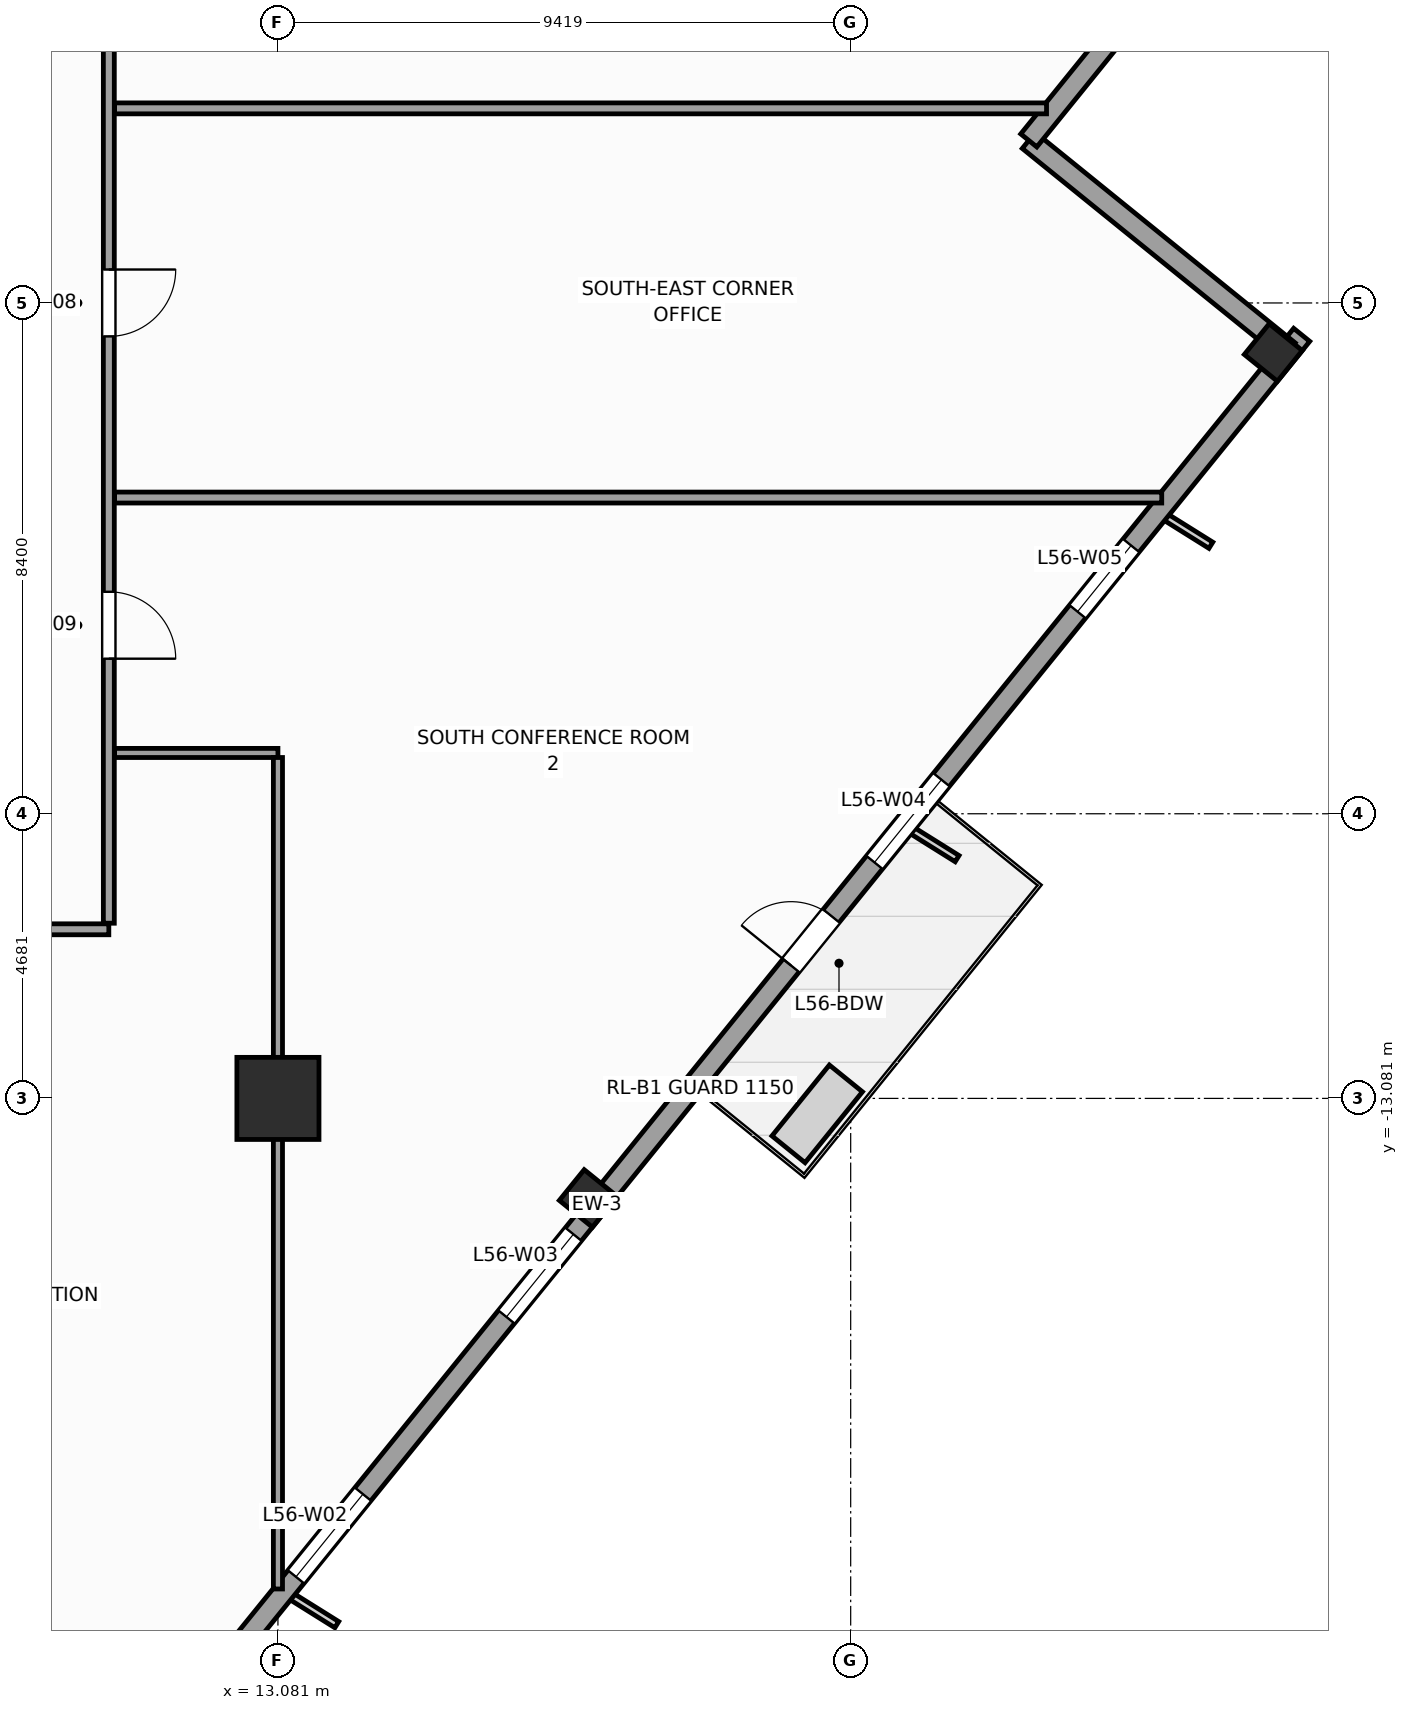
"""IFC4 building model, lengths in metres.
Left out: names, types, materials, properties, quantities, classifications, styles, units other than length and angle.
Written with IfcOpenShell. Run it as: python <this file> out.ifc"""

import sys

from ifc_helpers import new_model, si_unit, direction, frame, frame_2d, origin, origin_2d, place, context, subcontext, project, spatial, rectangle, extrude, source, transform, mapped, element, fill, save


model = new_model("IFC4")
c1 = context("Model", 3, precision=1e-05, world=origin(), true_north=direction((0.0, 1.0)))
c2 = subcontext(c1, "Body", "Model", "MODEL_VIEW")
j1 = project(units=[si_unit("LENGTHUNIT", "METRE"), si_unit("PLANEANGLEUNIT", "RADIAN")], contexts=[c1])
p1 = place(None, origin())
s1 = spatial("IfcSite", under=j1, at=p1, CompositionType="ELEMENT")
p2 = place(p1, origin())
s2 = spatial("IfcBuilding", under=s1, at=p2, CompositionType="ELEMENT")
p3 = place(p2, frame((0.0, 0.0, 232.9)))
s3 = spatial("IfcBuildingStorey", under=s2, at=p3, CompositionType="ELEMENT", Elevation=232.9)
m1 = source(origin(), c2, "Body", "SweptSolid", [
    extrude(rectangle(XDim=1.35, YDim=1.35, at=origin_2d()), origin(), (0.0, 0.0, 1.0), 3.9),
])
p4 = place(p3, frame((13.081, -13.081, 0.0), z_axis=(0.0, 0.0, 1.0), x_axis=(1.0, 0.0, 0.0)))
e1 = element("IfcColumn", 1, at=p4, inside=s3, PredefinedType="COLUMN", context=c2, shape_type="MappedRepresentation", body=[
    mapped(m1, transform((0.0, 0.0, 0.0), scale=1.0)),
])
m2 = source(origin(), c2, "Body", "SweptSolid", [
    extrude(rectangle(XDim=0.65, YDim=0.7, at=origin_2d()), origin(), (0.0, 0.0, 1.0), 3.9),
])
for number, where, z_axis, x_axis in (
    (2, (18.185, -14.726, 0.0), (0.0, 0.0, 1.0), (0.629, 0.777, 0.0)),
    (3, (29.45, -0.815, 0.0), (0.0, 0.0, 1.0), (0.629, 0.777, 0.0)),
):
    element("IfcColumn", number, at=place(p3, frame(where, z_axis=z_axis, x_axis=x_axis)), inside=s3, PredefinedType="COLUMN", context=c2, shape_type="MappedRepresentation", body=[
        mapped(m2, transform((0.0, 0.0, 0.0), scale=1.0)),
    ])
p5 = place(p3, frame((6.733, -29.154, 0.0), z_axis=(0.0, 0.0, 1.0), x_axis=(0.629325378072, 0.77714192302, 0.0)))
e4 = element("IfcWall", 4, at=p5, inside=s3, PredefinedType="STANDARD", context=c2, shape_type="SweptSolid", body=[
    extrude(rectangle(XDim=36.84, YDim=0.34, at=frame_2d((18.42, 0.0))), origin(), (0.0, 0.0, 1.0), 2.96),
])
p6 = place(p5, frame((23.495, 0.0, 0.0)))
e5 = element("IfcOpeningElement", 5, at=p6, cuts=e4, PredefinedType="OPENING", context=c2, shape_type="SweptSolid", body=[
    extrude(rectangle(XDim=1.05, YDim=2.25, at=frame_2d((0.525, 1.125))), frame((0.0, 0.18, 0.0), z_axis=(0.0, -1.0, 0.0), x_axis=(1.0, 0.0, 0.0)), (0.0, 0.0, 1.0), 0.36),
])
p7 = place(p5, frame((3.721, 0.0, 0.48)))
e6 = element("IfcOpeningElement", 6, at=p7, cuts=e4, PredefinedType="OPENING", context=c2, shape_type="SweptSolid", body=[
    extrude(rectangle(XDim=1.4, YDim=2.4, at=frame_2d((0.7, 1.2))), frame((0.0, 0.18, 0.0), z_axis=(0.0, -1.0, 0.0), x_axis=(1.0, 0.0, 0.0)), (0.0, 0.0, 1.0), 0.36),
])
p8 = place(p5, frame((10.559, 0.0, 0.58)))
e7 = element("IfcOpeningElement", 7, at=p8, cuts=e4, PredefinedType="OPENING", context=c2, shape_type="SweptSolid", body=[
    extrude(rectangle(XDim=1.75, YDim=2.3, at=frame_2d((0.875, 1.15))), frame((0.0, 0.18, 0.0), z_axis=(0.0, -1.0, 0.0), x_axis=(1.0, 0.0, 0.0)), (0.0, 0.0, 1.0), 0.36),
])
p9 = place(p5, frame((16.058, 0.0, 0.58)))
e8 = element("IfcOpeningElement", 8, at=p9, cuts=e4, PredefinedType="OPENING", context=c2, shape_type="SweptSolid", body=[
    extrude(rectangle(XDim=1.75, YDim=2.3, at=frame_2d((0.875, 1.15))), frame((0.0, 0.18, 0.0), z_axis=(0.0, -1.0, 0.0), x_axis=(1.0, 0.0, 0.0)), (0.0, 0.0, 1.0), 0.36),
])
p10 = place(p5, frame((25.676, 0.0, 0.58)))
e9 = element("IfcOpeningElement", 9, at=p10, cuts=e4, PredefinedType="OPENING", context=c2, shape_type="SweptSolid", body=[
    extrude(rectangle(XDim=1.75, YDim=2.3, at=frame_2d((0.875, 1.15))), frame((0.0, 0.18, 0.0), z_axis=(0.0, -1.0, 0.0), x_axis=(1.0, 0.0, 0.0)), (0.0, 0.0, 1.0), 0.36),
])
p11 = place(p5, frame((30.982, 0.0, 0.48)))
e10 = element("IfcOpeningElement", 10, at=p11, cuts=e4, PredefinedType="OPENING", context=c2, shape_type="SweptSolid", body=[
    extrude(rectangle(XDim=1.4, YDim=2.4, at=frame_2d((0.7, 1.2))), frame((0.0, 0.18, 0.0), z_axis=(0.0, -1.0, 0.0), x_axis=(1.0, 0.0, 0.0)), (0.0, 0.0, 1.0), 0.36),
])
p12 = place(p3, frame((29.703, -0.789, 0.0), z_axis=(0.0, 0.0, 1.0), x_axis=(-0.77714355312, 0.629323365087, 0.0)))
e11 = element("IfcWall", 11, at=p12, inside=s3, PredefinedType="STANDARD", context=c2, shape_type="SweptSolid", body=[
    extrude(rectangle(XDim=5.5, YDim=0.34, at=frame_2d((2.75, 0.0))), origin(), (0.0, 0.0, 1.0), 3.66),
])
p13 = place(p3, frame((25.429, 2.673, 0.0), z_axis=(0.0, 0.0, 1.0), x_axis=(0.629299794138, 0.777162640055, 0.0)))
e12 = element("IfcWall", 12, at=p13, inside=s3, PredefinedType="STANDARD", context=c2, shape_type="SweptSolid", body=[
    extrude(rectangle(XDim=5.67, YDim=0.34, at=frame_2d((2.835, 0.0))), origin(), (0.0, 0.0, 1.0), 3.66),
])
p14 = place(p13, frame((2.135, 0.0, 0.48)))
e13 = element("IfcOpeningElement", 13, at=p14, cuts=e12, PredefinedType="OPENING", context=c2, shape_type="SweptSolid", body=[
    extrude(rectangle(XDim=1.4, YDim=2.4, at=frame_2d((0.7, 1.2))), frame((0.0, 0.18, 0.0), z_axis=(0.0, -1.0, 0.0), x_axis=(1.0, 0.0, 0.0)), (0.0, 0.0, 1.0), 0.36),
])
p15 = place(p3, frame((-11.4, -10.3, 0.0), z_axis=(0.0, 0.0, 1.0), x_axis=(1.0, 0.0, 0.0)))
e14 = element("IfcWall", 14, at=p15, inside=s3, PredefinedType="PARTITIONING", context=c2, shape_type="SweptSolid", body=[
    extrude(rectangle(XDim=21.7, YDim=0.18, at=frame_2d((10.85, 0.0))), origin(), (0.0, 0.0, 1.0), 3.66),
])
p16 = place(p15, frame((12.989, 0.0, 0.0)))
e15 = element("IfcOpeningElement", 15, at=p16, cuts=e14, PredefinedType="OPENING", context=c2, shape_type="SweptSolid", body=[
    extrude(rectangle(XDim=0.95, YDim=2.1, at=frame_2d((0.475, 1.05))), frame((0.0, 0.1, 0.0), z_axis=(0.0, -1.0, 0.0), x_axis=(1.0, 0.0, 0.0)), (0.0, 0.0, 1.0), 0.2),
])
p17 = place(p15, frame((17.585, 0.0, 0.0)))
e16 = element("IfcOpeningElement", 16, at=p17, cuts=e14, PredefinedType="OPENING", context=c2, shape_type="SweptSolid", body=[
    extrude(rectangle(XDim=1.1, YDim=2.2, at=frame_2d((0.55, 1.1))), frame((0.0, 0.1, 0.0), z_axis=(0.0, -1.0, 0.0), x_axis=(1.0, 0.0, 0.0)), (0.0, 0.0, 1.0), 0.2),
])
p18 = place(p15, frame((9.075, 0.0, 0.0)))
e17 = element("IfcOpeningElement", 17, at=p18, cuts=e14, PredefinedType="OPENING", context=c2, shape_type="SweptSolid", body=[
    extrude(rectangle(XDim=1.1, YDim=2.2, at=frame_2d((0.55, 1.1))), frame((0.0, 0.1, 0.0), z_axis=(0.0, -1.0, 0.0), x_axis=(1.0, 0.0, 0.0)), (0.0, 0.0, 1.0), 0.2),
])
p19 = place(p15, frame((3.724, 0.0, 0.0)))
e18 = element("IfcOpeningElement", 18, at=p19, cuts=e14, PredefinedType="OPENING", context=c2, shape_type="SweptSolid", body=[
    extrude(rectangle(XDim=1.1, YDim=2.2, at=frame_2d((0.55, 1.1))), frame((0.0, 0.1, 0.0), z_axis=(0.0, -1.0, 0.0), x_axis=(1.0, 0.0, 0.0)), (0.0, 0.0, 1.0), 0.2),
])
p20 = place(p3, frame((10.3, -10.2, 0.0), z_axis=(0.0, 0.0, 1.0), x_axis=(0.0, 1.0, 0.0)))
e19 = element("IfcWall", 19, at=p20, inside=s3, PredefinedType="PARTITIONING", context=c2, shape_type="SweptSolid", body=[
    extrude(rectangle(XDim=20.4, YDim=0.18, at=frame_2d((10.2, 0.0))), origin(), (0.0, 0.0, 1.0), 3.66),
])
p21 = place(p20, frame((14.95, 0.0, 0.0)))
e20 = element("IfcOpeningElement", 20, at=p21, cuts=e19, PredefinedType="OPENING", context=c2, shape_type="SweptSolid", body=[
    extrude(rectangle(XDim=1.1, YDim=2.2, at=frame_2d((0.55, 1.1))), frame((0.0, 0.1, 0.0), z_axis=(0.0, -1.0, 0.0), x_axis=(1.0, 0.0, 0.0)), (0.0, 0.0, 1.0), 0.2),
])
p22 = place(p20, frame((9.65, 0.0, 0.0)))
e21 = element("IfcOpeningElement", 21, at=p22, cuts=e19, PredefinedType="OPENING", context=c2, shape_type="SweptSolid", body=[
    extrude(rectangle(XDim=1.1, YDim=2.2, at=frame_2d((0.55, 1.1))), frame((0.0, 0.1, 0.0), z_axis=(0.0, -1.0, 0.0), x_axis=(1.0, 0.0, 0.0)), (0.0, 0.0, 1.0), 0.2),
])
p23 = place(p20, frame((4.35, 0.0, 0.0)))
e22 = element("IfcOpeningElement", 22, at=p23, cuts=e19, PredefinedType="OPENING", context=c2, shape_type="SweptSolid", body=[
    extrude(rectangle(XDim=1.1, YDim=2.2, at=frame_2d((0.55, 1.1))), frame((0.0, 0.1, 0.0), z_axis=(0.0, -1.0, 0.0), x_axis=(1.0, 0.0, 0.0)), (0.0, 0.0, 1.0), 0.2),
])
p24 = place(p3, frame((10.395, 3.2, 0.0), z_axis=(0.0, 0.0, 1.0), x_axis=(1.0, 0.0, 0.0)))
e23 = element("IfcWall", 23, at=p24, inside=s3, PredefinedType="PARTITIONING", context=c2, shape_type="SweptSolid", body=[
    extrude(rectangle(XDim=15.326, YDim=0.18, at=frame_2d((7.663, 0.0))), origin(), (0.0, 0.0, 1.0), 3.66),
])
p25 = place(p3, frame((10.395, -3.2, 0.0), z_axis=(0.0, 0.0, 1.0), x_axis=(1.0, 0.0, 0.0)))
e24 = element("IfcWall", 24, at=p25, inside=s3, PredefinedType="PARTITIONING", context=c2, shape_type="SweptSolid", body=[
    extrude(rectangle(XDim=17.22, YDim=0.18, at=frame_2d((8.61, 0.0))), origin(), (0.0, 0.0, 1.0), 3.66),
])
p26 = place(p3, frame((10.395, -7.4, 0.0), z_axis=(0.0, 0.0, 1.0), x_axis=(1.0, 0.0, 0.0)))
e25 = element("IfcWall", 25, at=p26, inside=s3, PredefinedType="PARTITIONING", context=c2, shape_type="SweptSolid", body=[
    extrude(rectangle(XDim=2.686, YDim=0.15, at=frame_2d((1.343, 0.0))), origin(), (0.0, 0.0, 1.0), 3.66),
])
p27 = place(p3, frame((13.081, -7.475, 0.0), z_axis=(0.0, 0.0, 1.0), x_axis=(0.0, -1.0, 0.0)))
e26 = element("IfcWall", 26, at=p27, inside=s3, PredefinedType="PARTITIONING", context=c2, shape_type="SweptSolid", body=[
    extrude(rectangle(XDim=13.673, YDim=0.15, at=frame_2d((6.837, 0.0))), origin(), (0.0, 0.0, 1.0), 2.76),
])
m3 = source(origin(), c2, "Body", "SweptSolid", [
    extrude(rectangle(XDim=1.05, YDim=2.25, at=frame_2d((0.525, 1.125))), frame((0.0, 0.025, 0.0), z_axis=(0.0, -1.0, 0.0), x_axis=(1.0, 0.0, 0.0)), (0.0, 0.0, 1.0), 0.05),
])
p28 = place(p6, origin())
e27 = element("IfcDoor", 27, at=p28, inside=s3, OperationType="SINGLE_SWING_LEFT", PredefinedType="DOOR", context=c2, shape_type="MappedRepresentation", body=[
    mapped(m3, transform((0.0, 0.0, 0.0), scale=1.0)),
])
fill(e5, e27)
m4 = source(origin(), c2, "Body", "SweptSolid", [
    extrude(rectangle(XDim=1.75, YDim=2.3, at=frame_2d((0.875, 1.15))), frame((0.0, 0.03, 0.0), z_axis=(0.0, -1.0, 0.0), x_axis=(1.0, 0.0, 0.0)), (0.0, 0.0, 1.0), 0.06),
])
p29 = place(p8, origin())
e28 = element("IfcWindow", 28, at=p29, inside=s3, PartitioningType="SINGLE_PANEL", PredefinedType="WINDOW", context=c2, shape_type="MappedRepresentation", body=[
    mapped(m4, transform((0.0, 0.0, 0.0), scale=1.0)),
])
fill(e7, e28)
p30 = place(p9, origin())
e29 = element("IfcWindow", 29, at=p30, inside=s3, PartitioningType="SINGLE_PANEL", PredefinedType="WINDOW", context=c2, shape_type="MappedRepresentation", body=[
    mapped(m4, transform((0.0, 0.0, 0.0), scale=1.0)),
])
fill(e8, e29)
p31 = place(p10, origin())
e30 = element("IfcWindow", 30, at=p31, inside=s3, PartitioningType="SINGLE_PANEL", PredefinedType="WINDOW", context=c2, shape_type="MappedRepresentation", body=[
    mapped(m4, transform((0.0, 0.0, 0.0), scale=1.0)),
])
fill(e9, e30)
m5 = source(origin(), c2, "Body", "SweptSolid", [
    extrude(rectangle(XDim=1.4, YDim=2.4, at=frame_2d((0.7, 1.2))), frame((0.0, 0.03, 0.0), z_axis=(0.0, -1.0, 0.0), x_axis=(1.0, 0.0, 0.0)), (0.0, 0.0, 1.0), 0.06),
])
p32 = place(p11, origin())
e31 = element("IfcWindow", 31, at=p32, inside=s3, PartitioningType="SINGLE_PANEL", PredefinedType="WINDOW", context=c2, shape_type="MappedRepresentation", body=[
    mapped(m5, transform((0.0, 0.0, 0.0), scale=1.0)),
])
fill(e10, e31)
m6 = source(origin(), c2, "Body", "SweptSolid", [
    extrude(rectangle(XDim=1.1, YDim=2.2, at=frame_2d((0.55, 1.1))), frame((0.0, 0.025, 0.0), z_axis=(0.0, -1.0, 0.0), x_axis=(1.0, 0.0, 0.0)), (0.0, 0.0, 1.0), 0.05),
])
p33 = place(p22, frame((1.1, 0.0, 0.0), z_axis=(0.0, 0.0, 1.0), x_axis=(-1.0, 0.0, 0.0)))
e32 = element("IfcDoor", 32, at=p33, inside=s3, OperationType="SINGLE_SWING_RIGHT", PredefinedType="DOOR", context=c2, shape_type="MappedRepresentation", body=[
    mapped(m6, transform((0.0, 0.0, 0.0), scale=1.0)),
])
fill(e21, e32)
p34 = place(p23, frame((1.1, 0.0, 0.0), z_axis=(0.0, 0.0, 1.0), x_axis=(-1.0, 0.0, 0.0)))
e33 = element("IfcDoor", 33, at=p34, inside=s3, OperationType="SINGLE_SWING_LEFT", PredefinedType="DOOR", context=c2, shape_type="MappedRepresentation", body=[
    mapped(m6, transform((0.0, 0.0, 0.0), scale=1.0)),
])
fill(e22, e33)
save(model, sys.argv[1])
